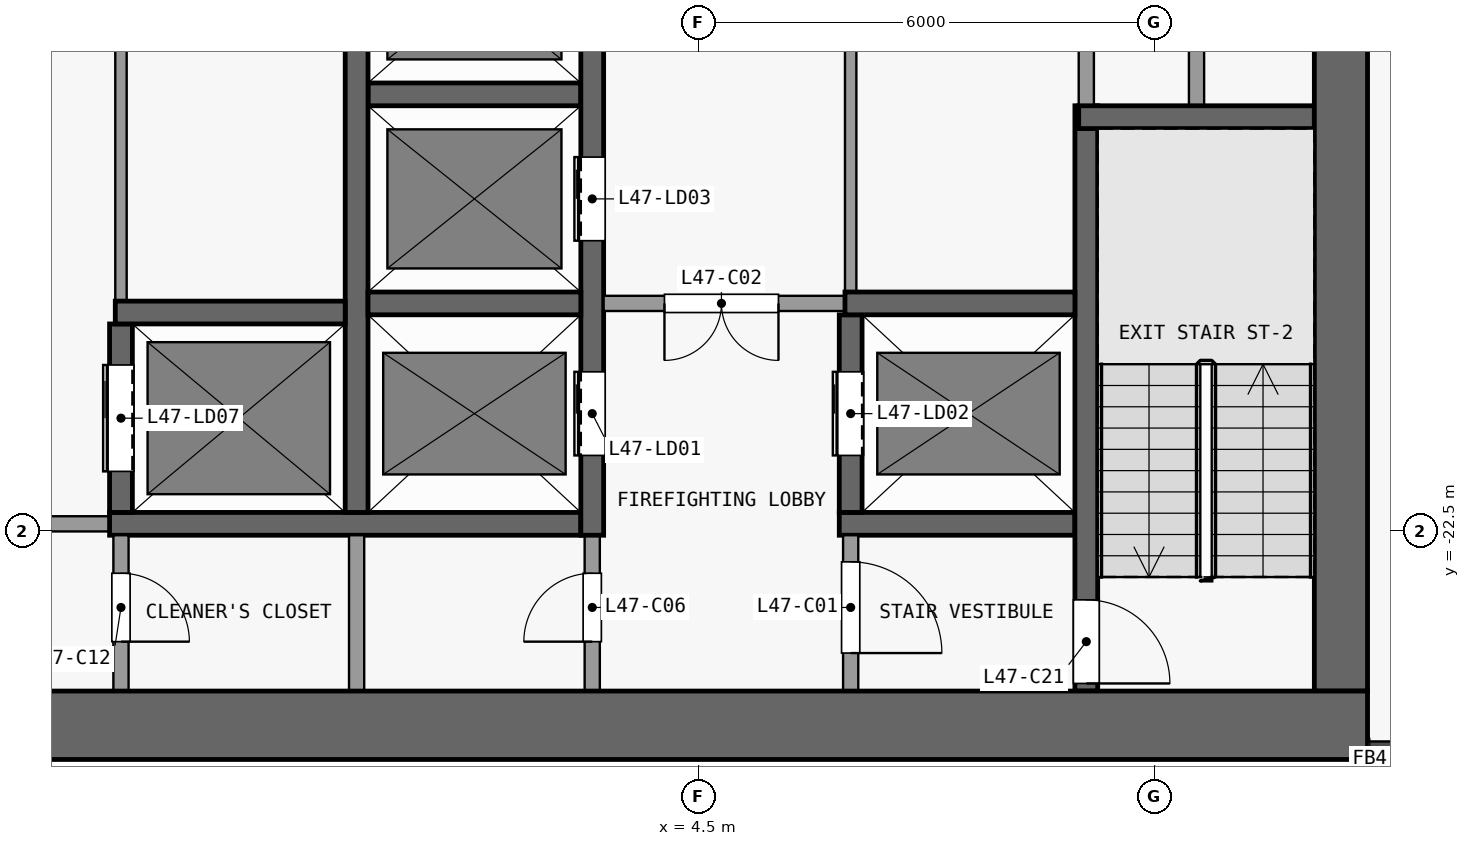
"""IFC4 building model, lengths in metres.
Left out: names, types, materials, properties, quantities, classifications, styles, units other than length and angle.
Written with IfcOpenShell. Run it as: python <this file> out.ifc"""

import sys

from ifc_helpers import new_model, si_unit, direction, frame, frame_2d, origin, place, context, subcontext, project, spatial, rectangle, extrude, element, fill, save


model = new_model("IFC4")
c1 = context("Model", 3, precision=1e-05, world=origin(), true_north=direction((0.0, 1.0)))
c2 = subcontext(c1, "Body", "Model", "MODEL_VIEW")
j1 = project(units=[si_unit("LENGTHUNIT", "METRE"), si_unit("PLANEANGLEUNIT", "RADIAN")], contexts=[c1])
p1 = place(None, origin())
s1 = spatial("IfcSite", under=j1, at=p1, CompositionType="ELEMENT")
p2 = place(p1, origin())
s2 = spatial("IfcBuilding", under=s1, at=p2, CompositionType="ELEMENT")
p3 = place(p2, frame((0.0, 0.0, 188.9)))
s3 = spatial("IfcBuildingStorey", under=s2, at=p3, CompositionType="ELEMENT", Elevation=188.9)
p4 = place(p3, frame((-13.3, -25.05, 0.0), z_axis=(0.0, 0.0, 1.0), x_axis=(1.0, 0.0, 0.0)))
e1 = element("IfcWall", 1, at=p4, inside=s3, PredefinedType="SHEAR", context=c2, shape_type="SweptSolid", body=[
    extrude(rectangle(XDim=26.6, YDim=0.9, at=frame_2d((13.3, 0.0))), origin(), (0.0, 0.0, 1.0), 3.3),
])
p5 = place(p3, frame((12.95, -24.6, 0.0), z_axis=(0.0, 0.0, 1.0), x_axis=(0.0, 1.0, 0.0)))
e2 = element("IfcWall", 2, at=p5, inside=s3, PredefinedType="SHEAR", context=c2, shape_type="SweptSolid", body=[
    extrude(rectangle(XDim=16.1, YDim=0.7, at=frame_2d((8.05, 0.0))), origin(), (0.0, 0.0, 1.0), 3.3),
])
p6 = place(p3, frame((-3.25, -22.4, 0.0), z_axis=(0.0, 0.0, 1.0), x_axis=(-1.0, 0.0, 0.0)))
e3 = element("IfcWall", 3, at=p6, inside=s3, PredefinedType="PARTITIONING", context=c2, shape_type="SweptSolid", body=[
    extrude(rectangle(XDim=6.2, YDim=0.2, at=frame_2d((3.1, 0.0))), origin(), (0.0, 0.0, 1.0), 3.3),
])
p7 = place(p6, frame((0.8, 0.0, 0.0)))
e4 = element("IfcOpeningElement", 4, at=p7, cuts=e3, PredefinedType="OPENING", context=c2, shape_type="SweptSolid", body=[
    extrude(rectangle(XDim=1.5, YDim=2.1, at=frame_2d((0.75, 1.05))), frame((0.0, 0.11, 0.0), z_axis=(0.0, -1.0, 0.0), x_axis=(1.0, 0.0, 0.0)), (0.0, 0.0, 1.0), 0.22),
])
p8 = place(p3, frame((-3.25, -22.4, 0.0), z_axis=(0.0, 0.0, 1.0), x_axis=(1.0, 0.0, 0.0)))
e5 = element("IfcWall", 5, at=p8, inside=s3, PredefinedType="SHEAR", context=c2, shape_type="SweptSolid", body=[
    extrude(rectangle(XDim=6.2, YDim=0.3, at=frame_2d((3.1, 0.0))), origin(), (0.0, 0.0, 1.0), 3.3),
])
p9 = place(p3, frame((6.35, -22.4, 0.0), z_axis=(0.0, 0.0, 1.0), x_axis=(1.0, 0.0, 0.0)))
e6 = element("IfcWall", 6, at=p9, inside=s3, PredefinedType="SHEAR", context=c2, shape_type="SweptSolid", body=[
    extrude(rectangle(XDim=3.1, YDim=0.3, at=frame_2d((1.55, 0.0))), origin(), (0.0, 0.0, 1.0), 3.3),
])
p10 = place(p3, frame((-3.175, -19.62, 0.0), z_axis=(0.0, 0.0, 1.0), x_axis=(1.0, 0.0, 0.0)))
e7 = element("IfcWall", 7, at=p10, inside=s3, PredefinedType="SHEAR", context=c2, shape_type="SweptSolid", body=[
    extrude(rectangle(XDim=3.025, YDim=0.3, at=frame_2d((1.513, 0.0))), origin(), (0.0, 0.0, 1.0), 3.3),
])
p11 = place(p3, frame((0.15, -19.5, 0.0), z_axis=(0.0, 0.0, 1.0), x_axis=(1.0, 0.0, 0.0)))
e8 = element("IfcWall", 8, at=p11, inside=s3, PredefinedType="SHEAR", context=c2, shape_type="SweptSolid", body=[
    extrude(rectangle(XDim=2.8, YDim=0.3, at=frame_2d((1.4, 0.0))), origin(), (0.0, 0.0, 1.0), 3.3),
])
p12 = place(p3, frame((6.575, -19.5, 0.0), z_axis=(0.0, 0.0, 1.0), x_axis=(-1.0, 0.0, 0.0)))
e9 = element("IfcWall", 9, at=p12, inside=s3, PredefinedType="PARTITIONING", context=c2, shape_type="SweptSolid", body=[
    extrude(rectangle(XDim=3.325, YDim=0.2, at=frame_2d((1.663, 0.0))), origin(), (0.0, 0.0, 1.0), 3.3),
])
p13 = place(p12, frame((1.025, 0.0, 0.0)))
e10 = element("IfcOpeningElement", 10, at=p13, cuts=e9, PredefinedType="OPENING", context=c2, shape_type="SweptSolid", body=[
    extrude(rectangle(XDim=1.5, YDim=2.1, at=frame_2d((0.75, 1.05))), frame((0.0, 0.11, 0.0), z_axis=(0.0, -1.0, 0.0), x_axis=(1.0, 0.0, 0.0)), (0.0, 0.0, 1.0), 0.22),
])
p14 = place(p3, frame((6.425, -19.5, 0.0), z_axis=(0.0, 0.0, 1.0), x_axis=(1.0, 0.0, 0.0)))
e11 = element("IfcWall", 11, at=p14, inside=s3, PredefinedType="SHEAR", context=c2, shape_type="SweptSolid", body=[
    extrude(rectangle(XDim=3.025, YDim=0.3, at=frame_2d((1.512, 0.0))), origin(), (0.0, 0.0, 1.0), 3.3),
])
p15 = place(p3, frame((9.5, -17.05, 0.0), z_axis=(0.0, 0.0, 1.0), x_axis=(1.0, 0.0, 0.0)))
e12 = element("IfcWall", 12, at=p15, inside=s3, PredefinedType="SHEAR", context=c2, shape_type="SweptSolid", body=[
    extrude(rectangle(XDim=3.1, YDim=0.3, at=frame_2d((1.55, 0.0))), origin(), (0.0, 0.0, 1.0), 3.3),
])
p16 = place(p3, frame((0.15, -16.75, 0.0), z_axis=(0.0, 0.0, 1.0), x_axis=(1.0, 0.0, 0.0)))
e13 = element("IfcWall", 13, at=p16, inside=s3, PredefinedType="SHEAR", context=c2, shape_type="SweptSolid", body=[
    extrude(rectangle(XDim=2.8, YDim=0.3, at=frame_2d((1.4, 0.0))), origin(), (0.0, 0.0, 1.0), 3.3),
])
p17 = place(p3, frame((-3.1, -22.55, 0.0), z_axis=(0.0, 0.0, 1.0), x_axis=(0.0, -1.0, 0.0)))
e14 = element("IfcWall", 14, at=p17, inside=s3, PredefinedType="PARTITIONING", context=c2, shape_type="SweptSolid", body=[
    extrude(rectangle(XDim=2.05, YDim=0.2, at=frame_2d((1.025, 0.0))), origin(), (0.0, 0.0, 1.0), 3.3),
])
p18 = place(p17, frame((0.5, 0.0, 0.0)))
e15 = element("IfcOpeningElement", 15, at=p18, cuts=e14, PredefinedType="OPENING", context=c2, shape_type="SweptSolid", body=[
    extrude(rectangle(XDim=0.9, YDim=2.1, at=frame_2d((0.45, 1.05))), frame((0.0, 0.11, 0.0), z_axis=(0.0, -1.0, 0.0), x_axis=(1.0, 0.0, 0.0)), (0.0, 0.0, 1.0), 0.22),
])
p19 = place(p3, frame((-3.1, -22.25, 0.0), z_axis=(0.0, 0.0, 1.0), x_axis=(0.0, 1.0, 0.0)))
e16 = element("IfcWall", 16, at=p19, inside=s3, PredefinedType="SHEAR", context=c2, shape_type="SweptSolid", body=[
    extrude(rectangle(XDim=2.48, YDim=0.3, at=frame_2d((1.24, 0.0))), origin(), (0.0, 0.0, 1.0), 3.3),
])
p20 = place(p19, frame((0.54, 0.0, 0.0)))
e17 = element("IfcOpeningElement", 17, at=p20, cuts=e16, PredefinedType="OPENING", context=c2, shape_type="SweptSolid", body=[
    extrude(rectangle(XDim=1.4, YDim=2.1, at=frame_2d((0.7, 1.05))), frame((0.0, 0.16, 0.0), z_axis=(0.0, -1.0, 0.0), x_axis=(1.0, 0.0, 0.0)), (0.0, 0.0, 1.0), 0.32),
])
p21 = place(p3, frame((-3.1, -8.5, 0.0), z_axis=(0.0, 0.0, 1.0), x_axis=(0.0, -1.0, 0.0)))
e18 = element("IfcWall", 18, at=p21, inside=s3, PredefinedType="PARTITIONING", context=c2, shape_type="SweptSolid", body=[
    extrude(rectangle(XDim=10.97, YDim=0.15, at=frame_2d((5.485, 0.0))), origin(), (0.0, 0.0, 1.0), 3.3),
])
p22 = place(p21, frame((4.96, 0.0, 0.0)))
e19 = element("IfcOpeningElement", 19, at=p22, cuts=e18, PredefinedType="OPENING", context=c2, shape_type="SweptSolid", body=[
    extrude(rectangle(XDim=1.2, YDim=2.1, at=frame_2d((0.6, 1.05))), frame((0.0, 0.085, 0.0), z_axis=(0.0, -1.0, 0.0), x_axis=(1.0, 0.0, 0.0)), (0.0, 0.0, 1.0), 0.17),
])
p23 = place(p3, frame((0.0, -24.6, 0.0), z_axis=(0.0, 0.0, 1.0), x_axis=(0.0, 1.0, 0.0)))
e20 = element("IfcWall", 20, at=p23, inside=s3, PredefinedType="PARTITIONING", context=c2, shape_type="SweptSolid", body=[
    extrude(rectangle(XDim=2.05, YDim=0.2, at=frame_2d((1.025, 0.0))), origin(), (0.0, 0.0, 1.0), 3.3),
])
p24 = place(p3, frame((0.0, -22.25, 0.0), z_axis=(0.0, 0.0, 1.0), x_axis=(0.0, 1.0, 0.0)))
e21 = element("IfcWall", 21, at=p24, inside=s3, PredefinedType="SHEAR", context=c2, shape_type="SweptSolid", body=[
    extrude(rectangle(XDim=13.75, YDim=0.3, at=frame_2d((6.875, 0.0))), origin(), (0.0, 0.0, 1.0), 3.3),
])
p25 = place(p3, frame((3.1, -24.6, 0.0), z_axis=(0.0, 0.0, 1.0), x_axis=(0.0, 1.0, 0.0)))
e22 = element("IfcWall", 22, at=p25, inside=s3, PredefinedType="PARTITIONING", context=c2, shape_type="SweptSolid", body=[
    extrude(rectangle(XDim=2.05, YDim=0.2, at=frame_2d((1.025, 0.0))), origin(), (0.0, 0.0, 1.0), 3.3),
])
p26 = place(p25, frame((0.65, 0.0, 0.0)))
e23 = element("IfcOpeningElement", 23, at=p26, cuts=e22, PredefinedType="OPENING", context=c2, shape_type="SweptSolid", body=[
    extrude(rectangle(XDim=0.9, YDim=2.1, at=frame_2d((0.45, 1.05))), frame((0.0, 0.11, 0.0), z_axis=(0.0, -1.0, 0.0), x_axis=(1.0, 0.0, 0.0)), (0.0, 0.0, 1.0), 0.22),
])
p27 = place(p3, frame((3.1, -22.55, 0.0), z_axis=(0.0, 0.0, 1.0), x_axis=(0.0, 1.0, 0.0)))
e24 = element("IfcWall", 24, at=p27, inside=s3, PredefinedType="SHEAR", context=c2, shape_type="SweptSolid", body=[
    extrude(rectangle(XDim=14.05, YDim=0.3, at=frame_2d((7.025, 0.0))), origin(), (0.0, 0.0, 1.0), 3.3),
])
p28 = place(p27, frame((1.05, 0.0, 0.0)))
e25 = element("IfcOpeningElement", 25, at=p28, cuts=e24, PredefinedType="OPENING", context=c2, shape_type="SweptSolid", body=[
    extrude(rectangle(XDim=1.1, YDim=2.1, at=frame_2d((0.55, 1.05))), frame((0.0, 0.16, 0.0), z_axis=(0.0, -1.0, 0.0), x_axis=(1.0, 0.0, 0.0)), (0.0, 0.0, 1.0), 0.32),
])
p29 = place(p27, frame((3.875, 0.0, 0.0)))
e26 = element("IfcOpeningElement", 26, at=p29, cuts=e24, PredefinedType="OPENING", context=c2, shape_type="SweptSolid", body=[
    extrude(rectangle(XDim=1.1, YDim=2.1, at=frame_2d((0.55, 1.05))), frame((0.0, 0.16, 0.0), z_axis=(0.0, -1.0, 0.0), x_axis=(1.0, 0.0, 0.0)), (0.0, 0.0, 1.0), 0.32),
])
p30 = place(p27, frame((6.625, 0.0, 0.0)))
e27 = element("IfcOpeningElement", 27, at=p30, cuts=e24, PredefinedType="OPENING", context=c2, shape_type="SweptSolid", body=[
    extrude(rectangle(XDim=1.1, YDim=2.1, at=frame_2d((0.55, 1.05))), frame((0.0, 0.16, 0.0), z_axis=(0.0, -1.0, 0.0), x_axis=(1.0, 0.0, 0.0)), (0.0, 0.0, 1.0), 0.32),
])
p31 = place(p27, frame((9.375, 0.0, 0.0)))
e28 = element("IfcOpeningElement", 28, at=p31, cuts=e24, PredefinedType="OPENING", context=c2, shape_type="SweptSolid", body=[
    extrude(rectangle(XDim=1.1, YDim=2.1, at=frame_2d((0.55, 1.05))), frame((0.0, 0.16, 0.0), z_axis=(0.0, -1.0, 0.0), x_axis=(1.0, 0.0, 0.0)), (0.0, 0.0, 1.0), 0.32),
])
p32 = place(p27, frame((12.125, 0.0, 0.0)))
e29 = element("IfcOpeningElement", 29, at=p32, cuts=e24, PredefinedType="OPENING", context=c2, shape_type="SweptSolid", body=[
    extrude(rectangle(XDim=1.1, YDim=2.1, at=frame_2d((0.55, 1.05))), frame((0.0, 0.16, 0.0), z_axis=(0.0, -1.0, 0.0), x_axis=(1.0, 0.0, 0.0)), (0.0, 0.0, 1.0), 0.32),
])
p33 = place(p3, frame((6.5, -22.55, 0.0), z_axis=(0.0, 0.0, 1.0), x_axis=(0.0, -1.0, 0.0)))
e30 = element("IfcWall", 30, at=p33, inside=s3, PredefinedType="PARTITIONING", context=c2, shape_type="SweptSolid", body=[
    extrude(rectangle(XDim=2.05, YDim=0.2, at=frame_2d((1.025, 0.0))), origin(), (0.0, 0.0, 1.0), 3.3),
])
p34 = place(p33, frame((0.35, 0.0, 0.0)))
e31 = element("IfcOpeningElement", 31, at=p34, cuts=e30, PredefinedType="OPENING", context=c2, shape_type="SweptSolid", body=[
    extrude(rectangle(XDim=1.2, YDim=2.1, at=frame_2d((0.6, 1.05))), frame((0.0, 0.11, 0.0), z_axis=(0.0, -1.0, 0.0), x_axis=(1.0, 0.0, 0.0)), (0.0, 0.0, 1.0), 0.22),
])
p35 = place(p3, frame((6.5, -22.25, 0.0), z_axis=(0.0, 0.0, 1.0), x_axis=(0.0, 1.0, 0.0)))
e32 = element("IfcWall", 32, at=p35, inside=s3, PredefinedType="SHEAR", context=c2, shape_type="SweptSolid", body=[
    extrude(rectangle(XDim=2.6, YDim=0.3, at=frame_2d((1.3, 0.0))), origin(), (0.0, 0.0, 1.0), 3.3),
])
p36 = place(p35, frame((0.75, 0.0, 0.0)))
e33 = element("IfcOpeningElement", 33, at=p36, cuts=e32, PredefinedType="OPENING", context=c2, shape_type="SweptSolid", body=[
    extrude(rectangle(XDim=1.1, YDim=2.1, at=frame_2d((0.55, 1.05))), frame((0.0, 0.16, 0.0), z_axis=(0.0, -1.0, 0.0), x_axis=(1.0, 0.0, 0.0)), (0.0, 0.0, 1.0), 0.32),
])
p37 = place(p3, frame((6.5, -8.5, 0.0), z_axis=(0.0, 0.0, 1.0), x_axis=(0.0, -1.0, 0.0)))
e34 = element("IfcWall", 34, at=p37, inside=s3, PredefinedType="PARTITIONING", context=c2, shape_type="SweptSolid", body=[
    extrude(rectangle(XDim=10.85, YDim=0.15, at=frame_2d((5.425, 0.0))), origin(), (0.0, 0.0, 1.0), 3.3),
])
p38 = place(p37, frame((6.275, 0.0, 0.0)))
e35 = element("IfcOpeningElement", 35, at=p38, cuts=e34, PredefinedType="OPENING", context=c2, shape_type="SweptSolid", body=[
    extrude(rectangle(XDim=1.2, YDim=2.1, at=frame_2d((0.6, 1.05))), frame((0.0, 0.085, 0.0), z_axis=(0.0, -1.0, 0.0), x_axis=(1.0, 0.0, 0.0)), (0.0, 0.0, 1.0), 0.17),
])
p39 = place(p37, frame((0.925, 0.0, 0.0)))
e36 = element("IfcOpeningElement", 36, at=p39, cuts=e34, PredefinedType="OPENING", context=c2, shape_type="SweptSolid", body=[
    extrude(rectangle(XDim=0.9, YDim=2.1, at=frame_2d((0.45, 1.05))), frame((0.0, 0.085, 0.0), z_axis=(0.0, -1.0, 0.0), x_axis=(1.0, 0.0, 0.0)), (0.0, 0.0, 1.0), 0.17),
])
p40 = place(p3, frame((9.6, -16.9, 0.0), z_axis=(0.0, 0.0, 1.0), x_axis=(0.0, -1.0, 0.0)))
e37 = element("IfcWall", 37, at=p40, inside=s3, PredefinedType="SHEAR", context=c2, shape_type="SweptSolid", body=[
    extrude(rectangle(XDim=7.7, YDim=0.3, at=frame_2d((3.85, 0.0))), origin(), (0.0, 0.0, 1.0), 3.3),
])
p41 = place(p40, frame((6.5, 0.0, 0.0)))
e38 = element("IfcOpeningElement", 38, at=p41, cuts=e37, PredefinedType="OPENING", context=c2, shape_type="SweptSolid", body=[
    extrude(rectangle(XDim=1.1, YDim=2.1, at=frame_2d((0.55, 1.05))), frame((0.0, 0.16, 0.0), z_axis=(0.0, -1.0, 0.0), x_axis=(1.0, 0.0, 0.0)), (0.0, 0.0, 1.0), 0.32),
])
p42 = place(p3, frame((9.6, -16.9, 0.0), z_axis=(0.0, 0.0, 1.0), x_axis=(0.0, 1.0, 0.0)))
e39 = element("IfcWall", 39, at=p42, inside=s3, PredefinedType="PARTITIONING", context=c2, shape_type="SweptSolid", body=[
    extrude(rectangle(XDim=8.4, YDim=0.2, at=frame_2d((4.2, 0.0))), origin(), (0.0, 0.0, 1.0), 3.3),
])
p43 = place(p3, frame((11.05, -11.2, 0.0), z_axis=(0.0, 0.0, 1.0), x_axis=(0.0, -1.0, 0.0)))
e40 = element("IfcWall", 40, at=p43, inside=s3, PredefinedType="PARTITIONING", context=c2, shape_type="SweptSolid", body=[
    extrude(rectangle(XDim=5.7, YDim=0.2, at=frame_2d((2.85, 0.0))), origin(), (0.0, 0.0, 1.0), 3.3),
])
p44 = place(p43, frame((2.525, 0.0, 0.0)))
e41 = element("IfcOpeningElement", 41, at=p44, cuts=e40, PredefinedType="OPENING", context=c2, shape_type="SweptSolid", body=[
    extrude(rectangle(XDim=0.9, YDim=2.1, at=frame_2d((0.45, 1.05))), frame((0.0, 0.11, 0.0), z_axis=(0.0, -1.0, 0.0), x_axis=(1.0, 0.0, 0.0)), (0.0, 0.0, 1.0), 0.22),
])
p45 = place(p28, origin())
e42 = element("IfcDoor", 42, at=p45, inside=s3, OperationType="DOUBLE_DOOR_SLIDING", PredefinedType="DOOR", context=c2, shape_type="SweptSolid", body=[
    extrude(rectangle(XDim=1.1, YDim=2.1, at=frame_2d((0.55, 1.05))), frame((0.0, 0.025, 0.0), z_axis=(0.0, -1.0, 0.0), x_axis=(1.0, 0.0, 0.0)), (0.0, 0.0, 1.0), 0.05),
])
fill(e25, e42)
p46 = place(p36, origin())
e43 = element("IfcDoor", 43, at=p46, inside=s3, OperationType="DOUBLE_DOOR_SLIDING", PredefinedType="DOOR", context=c2, shape_type="SweptSolid", body=[
    extrude(rectangle(XDim=1.1, YDim=2.1, at=frame_2d((0.55, 1.05))), frame((0.0, 0.025, 0.0), z_axis=(0.0, -1.0, 0.0), x_axis=(1.0, 0.0, 0.0)), (0.0, 0.0, 1.0), 0.05),
])
fill(e33, e43)
p47 = place(p29, origin())
e44 = element("IfcDoor", 44, at=p47, inside=s3, OperationType="DOUBLE_DOOR_SLIDING", PredefinedType="DOOR", context=c2, shape_type="SweptSolid", body=[
    extrude(rectangle(XDim=1.1, YDim=2.1, at=frame_2d((0.55, 1.05))), frame((0.0, 0.025, 0.0), z_axis=(0.0, -1.0, 0.0), x_axis=(1.0, 0.0, 0.0)), (0.0, 0.0, 1.0), 0.05),
])
fill(e26, e44)
p48 = place(p20, origin())
e45 = element("IfcDoor", 45, at=p48, inside=s3, OperationType="DOUBLE_DOOR_SLIDING", PredefinedType="DOOR", context=c2, shape_type="SweptSolid", body=[
    extrude(rectangle(XDim=1.4, YDim=2.1, at=frame_2d((0.7, 1.05))), frame((0.0, 0.025, 0.0), z_axis=(0.0, -1.0, 0.0), x_axis=(1.0, 0.0, 0.0)), (0.0, 0.0, 1.0), 0.05),
])
fill(e17, e45)
p49 = place(p34, origin())
e46 = element("IfcDoor", 46, at=p49, inside=s3, OperationType="SINGLE_SWING_RIGHT", PredefinedType="DOOR", context=c2, shape_type="SweptSolid", body=[
    extrude(rectangle(XDim=1.2, YDim=2.1, at=frame_2d((0.6, 1.05))), frame((0.0, 0.025, 0.0), z_axis=(0.0, -1.0, 0.0), x_axis=(1.0, 0.0, 0.0)), (0.0, 0.0, 1.0), 0.05),
])
fill(e31, e46)
p50 = place(p13, origin())
e47 = element("IfcDoor", 47, at=p50, inside=s3, OperationType="DOUBLE_DOOR_SINGLE_SWING", PredefinedType="DOOR", context=c2, shape_type="SweptSolid", body=[
    extrude(rectangle(XDim=1.5, YDim=2.1, at=frame_2d((0.75, 1.05))), frame((0.0, 0.025, 0.0), z_axis=(0.0, -1.0, 0.0), x_axis=(1.0, 0.0, 0.0)), (0.0, 0.0, 1.0), 0.05),
])
fill(e10, e47)
p51 = place(p26, origin())
e48 = element("IfcDoor", 48, at=p51, inside=s3, OperationType="SINGLE_SWING_LEFT", PredefinedType="DOOR", context=c2, shape_type="SweptSolid", body=[
    extrude(rectangle(XDim=0.9, YDim=2.1, at=frame_2d((0.45, 1.05))), frame((0.0, 0.025, 0.0), z_axis=(0.0, -1.0, 0.0), x_axis=(1.0, 0.0, 0.0)), (0.0, 0.0, 1.0), 0.05),
])
fill(e23, e48)
p52 = place(p18, origin())
e49 = element("IfcDoor", 49, at=p52, inside=s3, OperationType="SINGLE_SWING_RIGHT", PredefinedType="DOOR", context=c2, shape_type="SweptSolid", body=[
    extrude(rectangle(XDim=0.9, YDim=2.1, at=frame_2d((0.45, 1.05))), frame((0.0, 0.025, 0.0), z_axis=(0.0, -1.0, 0.0), x_axis=(1.0, 0.0, 0.0)), (0.0, 0.0, 1.0), 0.05),
])
fill(e15, e49)
p53 = place(p41, origin())
e50 = element("IfcDoor", 50, at=p53, inside=s3, OperationType="SINGLE_SWING_RIGHT", PredefinedType="DOOR", context=c2, shape_type="SweptSolid", body=[
    extrude(rectangle(XDim=1.1, YDim=2.1, at=frame_2d((0.55, 1.05))), frame((0.0, 0.025, 0.0), z_axis=(0.0, -1.0, 0.0), x_axis=(1.0, 0.0, 0.0)), (0.0, 0.0, 1.0), 0.05),
])
fill(e38, e50)
save(model, sys.argv[1])
